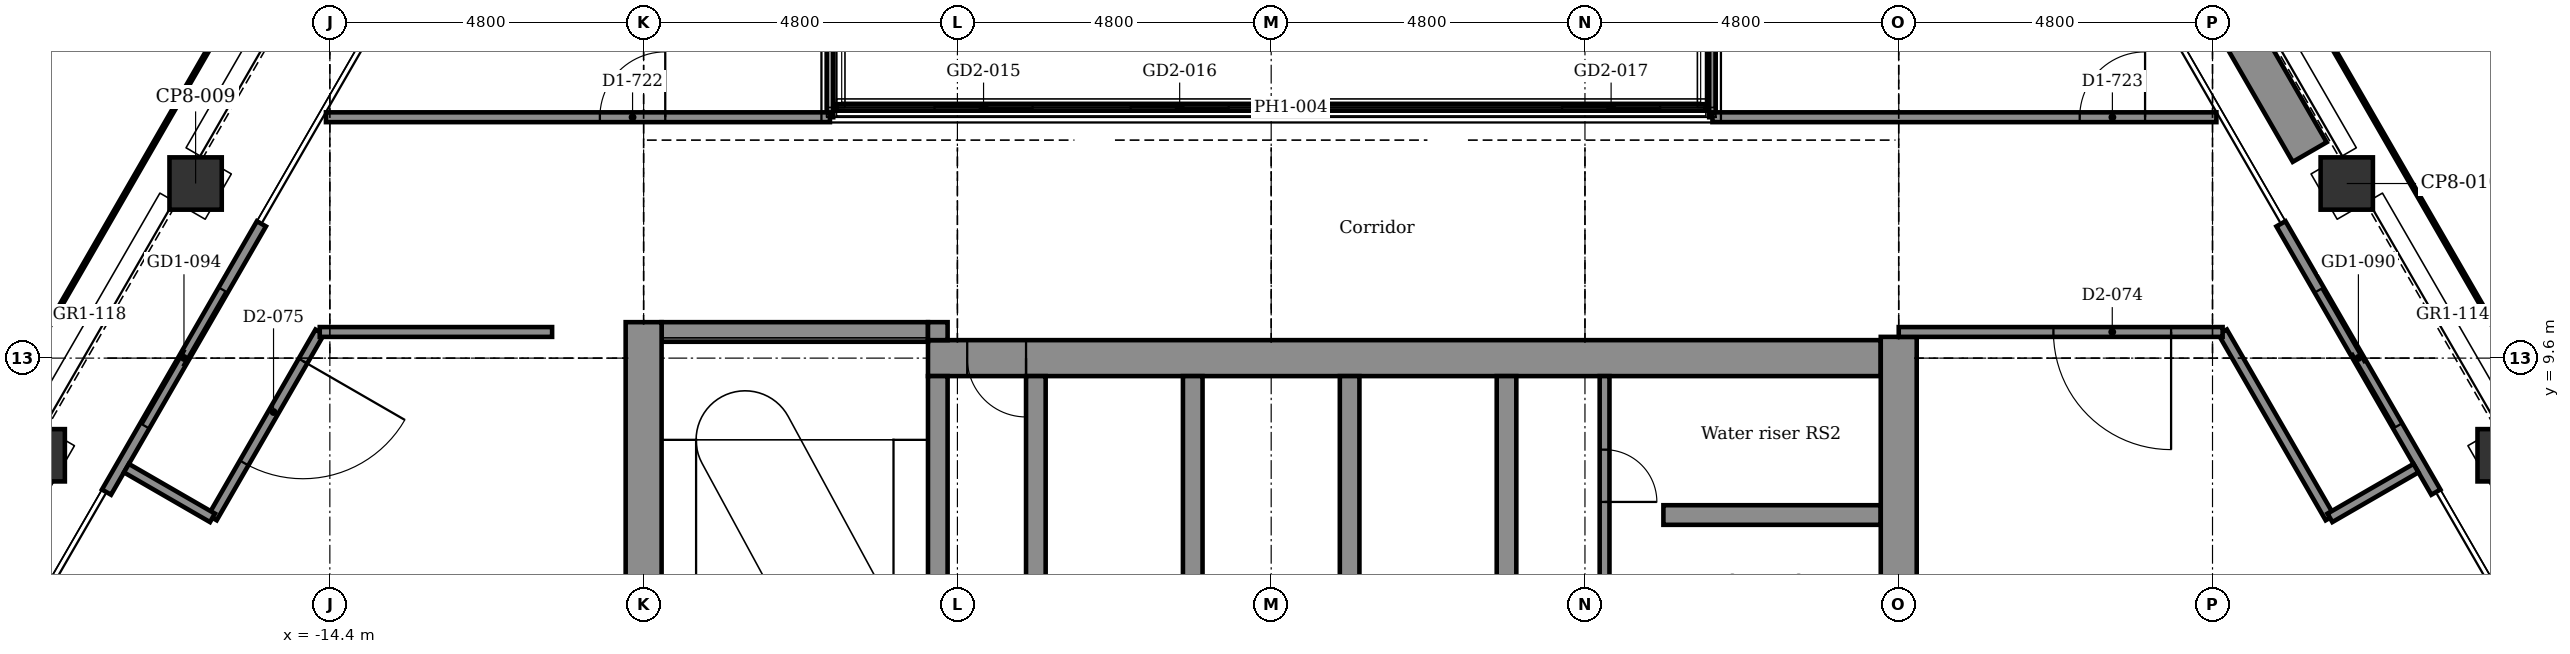
"""IFC4 building model, lengths in metres.
Left out: names, types, materials, properties, quantities, classifications, styles, units other than length and angle.
Written with IfcOpenShell. Run it as: python <this file> out.ifc"""

import sys

from ifc_helpers import new_model, si_unit, direction, frame, frame_2d, origin, origin_2d, place, context, subcontext, project, spatial, rectangle, extrude, element, fill, save


model = new_model("IFC4")
c1 = context("Model", 3, precision=1e-05, world=origin(), true_north=direction((0.0, 1.0)))
c2 = subcontext(c1, "Body", "Model", "MODEL_VIEW")
j1 = project(units=[si_unit("LENGTHUNIT", "METRE"), si_unit("PLANEANGLEUNIT", "RADIAN")], contexts=[c1])
p1 = place(None, origin())
s1 = spatial("IfcSite", under=j1, at=p1, CompositionType="ELEMENT")
p2 = place(p1, origin())
s2 = spatial("IfcBuilding", under=s1, at=p2, CompositionType="ELEMENT")
p3 = place(p2, frame((0.0, 0.0, 269.6)))
s3 = spatial("IfcBuildingStorey", under=s2, at=p3, CompositionType="ELEMENT", Elevation=269.6)
for number, where, z_axis, x_axis in (
    (1, (16.454, 12.271, -0.15), (0.0, 0.0, 1.0), (0.866, 0.5, 0.0)),
    (2, (18.854, 8.114, -0.15), (0.0, 0.0, 1.0), (0.866, 0.5, 0.0)),
    (3, (-18.854, 8.114, -0.15), (0.0, 0.0, 1.0), (0.5, 0.866, 0.0)),
    (4, (-16.454, 12.271, -0.15), (0.0, 0.0, 1.0), (0.5, 0.866, 0.0)),
):
    element("IfcColumn", number, at=place(p3, frame(where, z_axis=z_axis, x_axis=x_axis)), inside=s3, PredefinedType="COLUMN", context=c2, shape_type="SweptSolid", body=[
        extrude(rectangle(XDim=0.8, YDim=0.8, at=origin_2d()), origin(), (0.0, 0.0, 1.0), 3.9),
    ])
p4 = place(p3, frame((6.0, 7.2, -0.15), z_axis=(0.0, 0.0, 1.0), x_axis=(1.0, 0.0, 0.0)))
e5 = element("IfcWall", 5, at=p4, inside=s3, PredefinedType="STANDARD", context=c2, shape_type="SweptSolid", body=[
    extrude(rectangle(XDim=3.325, YDim=0.3, at=frame_2d((1.663, 0.0))), origin(), (0.0, 0.0, 1.0), 3.9),
])
p5 = place(p3, frame((-5.25, 9.6, -0.15), z_axis=(0.0, 0.0, 1.0), x_axis=(1.0, 0.0, 0.0)))
e6 = element("IfcWall", 6, at=p5, inside=s3, PredefinedType="SHEAR", context=c2, shape_type="SweptSolid", body=[
    extrude(rectangle(XDim=14.575, YDim=0.55, at=frame_2d((7.288, 0.0))), origin(), (0.0, 0.0, 1.0), 3.9),
])
p6 = place(p5, frame((0.6, 0.0, 0.15)))
e7 = element("IfcOpeningElement", 7, at=p6, cuts=e6, PredefinedType="OPENING", context=c2, shape_type="SweptSolid", body=[
    extrude(rectangle(XDim=0.9, YDim=2.1, at=frame_2d((0.45, 1.05))), frame((0.0, 0.285, 0.0), z_axis=(0.0, -1.0, 0.0), x_axis=(1.0, 0.0, 0.0)), (0.0, 0.0, 1.0), 0.57),
])
p7 = place(p3, frame((-9.325, 10.0, -0.15), z_axis=(0.0, 0.0, 1.0), x_axis=(1.0, 0.0, 0.0)))
e8 = element("IfcWall", 8, at=p7, inside=s3, PredefinedType="STANDARD", context=c2, shape_type="SweptSolid", body=[
    extrude(rectangle(XDim=4.075, YDim=0.3, at=frame_2d((2.038, 0.0))), origin(), (0.0, 0.0, 1.0), 3.9),
])
p8 = place(p3, frame((-9.6, 2.55, -0.15), z_axis=(0.0, 0.0, 1.0), x_axis=(0.0, 1.0, 0.0)))
e9 = element("IfcWall", 9, at=p8, inside=s3, PredefinedType="SHEAR", context=c2, shape_type="SweptSolid", body=[
    extrude(rectangle(XDim=7.6, YDim=0.55, at=frame_2d((3.8, 0.0))), origin(), (0.0, 0.0, 1.0), 3.9),
])
p9 = place(p3, frame((-5.1, 2.25, -0.15), z_axis=(0.0, 0.0, 1.0), x_axis=(0.0, 1.0, 0.0)))
e10 = element("IfcWall", 10, at=p9, inside=s3, PredefinedType="STANDARD", context=c2, shape_type="SweptSolid", body=[
    extrude(rectangle(XDim=7.075, YDim=0.3, at=frame_2d((3.538, 0.0))), origin(), (0.0, 0.0, 1.0), 3.9),
])
p10 = place(p9, frame((2.0, 0.0, 0.15)))
e11 = element("IfcOpeningElement", 11, at=p10, cuts=e10, PredefinedType="OPENING", context=c2, shape_type="SweptSolid", body=[
    extrude(rectangle(XDim=1.2, YDim=2.1, at=frame_2d((0.6, 1.05))), frame((0.0, 0.16, 0.0), z_axis=(0.0, -1.0, 0.0), x_axis=(1.0, 0.0, 0.0)), (0.0, 0.0, 1.0), 0.32),
])
p11 = place(p3, frame((-5.1, 9.875, -0.15), z_axis=(0.0, 0.0, 1.0), x_axis=(0.0, 1.0, 0.0)))
e12 = element("IfcWall", 12, at=p11, inside=s3, PredefinedType="STANDARD", context=c2, shape_type="SweptSolid", body=[
    extrude(rectangle(XDim=0.275, YDim=0.3, at=frame_2d((0.137, 0.0))), origin(), (0.0, 0.0, 1.0), 3.9),
])
for number, where, z_axis, x_axis in (
    (13, (-3.6, 5.85, -0.15), (0.0, 0.0, 1.0), (0.0, 1.0, 0.0)),
    (14, (-1.2, 5.85, -0.15), (0.0, 0.0, 1.0), (0.0, 1.0, 0.0)),
    (15, (1.2, 5.85, -0.15), (0.0, 0.0, 1.0), (0.0, 1.0, 0.0)),
    (16, (3.6, 5.85, -0.15), (0.0, 0.0, 1.0), (0.0, 1.0, 0.0)),
):
    element("IfcWall", number, at=place(p3, frame(where, z_axis=z_axis, x_axis=x_axis)), inside=s3, PredefinedType="STANDARD", context=c2, shape_type="SweptSolid", body=[
        extrude(rectangle(XDim=3.475, YDim=0.3, at=frame_2d((1.737, 0.0))), origin(), (0.0, 0.0, 1.0), 3.9),
    ])
p12 = place(p3, frame((9.6, -10.15, -0.15), z_axis=(0.0, 0.0, 1.0), x_axis=(0.0, 1.0, 0.0)))
e17 = element("IfcWall", 17, at=p12, inside=s3, PredefinedType="SHEAR", context=c2, shape_type="SweptSolid", body=[
    extrude(rectangle(XDim=20.075, YDim=0.55, at=frame_2d((10.038, 0.0))), origin(), (0.0, 0.0, 1.0), 3.9),
])
p13 = place(p3, frame((15.447, 11.655, 0.0), z_axis=(0.0, 0.0, 1.0), x_axis=(0.499978080042, -0.866038058908, 0.0)))
e18 = element("IfcWall", 18, at=p13, inside=s3, PredefinedType="PARTITIONING", context=c2, shape_type="SweptSolid", body=[
    extrude(rectangle(XDim=4.74, YDim=0.16, at=frame_2d((2.37, 0.0))), origin(), (0.0, 0.0, 1.0), 3.75),
])
p14 = place(p13, frame((1.17, 0.0, 0.0)))
e19 = element("IfcOpeningElement", 19, at=p14, cuts=e18, PredefinedType="OPENING", context=c2, shape_type="SweptSolid", body=[
    extrude(rectangle(XDim=2.4, YDim=2.4, at=frame_2d((1.2, 1.2))), frame((0.0, 0.09, 0.0), z_axis=(0.0, -1.0, 0.0), x_axis=(1.0, 0.0, 0.0)), (0.0, 0.0, 1.0), 0.18),
])
p15 = place(p3, frame((-17.817, 7.55, 0.0), z_axis=(0.0, 0.0, 1.0), x_axis=(0.499978080042, 0.866038058908, 0.0)))
e20 = element("IfcWall", 20, at=p15, inside=s3, PredefinedType="PARTITIONING", context=c2, shape_type="SweptSolid", body=[
    extrude(rectangle(XDim=4.74, YDim=0.16, at=frame_2d((2.37, 0.0))), origin(), (0.0, 0.0, 1.0), 3.75),
])
p16 = place(p15, frame((1.17, 0.0, 0.0)))
e21 = element("IfcOpeningElement", 21, at=p16, cuts=e20, PredefinedType="OPENING", context=c2, shape_type="SweptSolid", body=[
    extrude(rectangle(XDim=2.4, YDim=2.4, at=frame_2d((1.2, 1.2))), frame((0.0, 0.09, 0.0), z_axis=(0.0, -1.0, 0.0), x_axis=(1.0, 0.0, 0.0)), (0.0, 0.0, 1.0), 0.18),
])
p17 = place(p3, frame((14.187, 15.697, 0.0), z_axis=(0.0, 0.0, 1.0), x_axis=(0.499977295307, -0.866038511948, 0.0)))
e22 = element("IfcWall", 22, at=p17, inside=s3, PredefinedType="USERDEFINED", context=c2, shape_type="SweptSolid", body=[
    extrude(rectangle(XDim=3.4, YDim=0.6, at=frame_2d((1.7, 0.0))), origin(), (0.0, 0.0, 1.0), 0.7),
])
p18 = place(p3, frame((6.65, 13.435, 0.0), z_axis=(0.0, 0.0, 1.0), x_axis=(-1.0, 0.0, 0.0)))
e23 = element("IfcWall", 23, at=p18, inside=s3, PredefinedType="PARAPET", context=c2, shape_type="SweptSolid", body=[
    extrude(rectangle(XDim=13.3, YDim=0.1, at=frame_2d((6.65, 0.0))), origin(), (0.0, 0.0, 1.0), 2.5),
])
p19 = place(p18, frame((10.3, 0.0, 0.0)))
e24 = element("IfcOpeningElement", 24, at=p19, cuts=e23, PredefinedType="OPENING", context=c2, shape_type="SweptSolid", body=[
    extrude(rectangle(XDim=1.5, YDim=2.4, at=frame_2d((0.75, 1.2))), frame((0.0, 0.06, 0.0), z_axis=(0.0, -1.0, 0.0), x_axis=(1.0, 0.0, 0.0)), (0.0, 0.0, 1.0), 0.12),
])
p20 = place(p18, frame((7.3, 0.0, 0.0)))
e25 = element("IfcOpeningElement", 25, at=p20, cuts=e23, PredefinedType="OPENING", context=c2, shape_type="SweptSolid", body=[
    extrude(rectangle(XDim=1.5, YDim=2.4, at=frame_2d((0.75, 1.2))), frame((0.0, 0.06, 0.0), z_axis=(0.0, -1.0, 0.0), x_axis=(1.0, 0.0, 0.0)), (0.0, 0.0, 1.0), 0.12),
])
p21 = place(p18, frame((0.7, 0.0, 0.0)))
e26 = element("IfcOpeningElement", 26, at=p21, cuts=e23, PredefinedType="OPENING", context=c2, shape_type="SweptSolid", body=[
    extrude(rectangle(XDim=1.5, YDim=2.4, at=frame_2d((0.75, 1.2))), frame((0.0, 0.06, 0.0), z_axis=(0.0, -1.0, 0.0), x_axis=(1.0, 0.0, 0.0)), (0.0, 0.0, 1.0), 0.12),
])
p22 = place(p3, frame((6.75, 13.285, 0.0), z_axis=(0.0, 0.0, 1.0), x_axis=(0.0, 1.0, 0.0)))
e27 = element("IfcWall", 27, at=p22, inside=s3, PredefinedType="PARTITIONING", context=c2, shape_type="SweptSolid", body=[
    extrude(rectangle(XDim=5.83, YDim=0.1, at=frame_2d((2.915, 0.0))), origin(), (0.0, 0.0, 1.0), 3.75),
])
p23 = place(p3, frame((5.1, 6.0, 0.0), z_axis=(0.0, 0.0, 1.0), x_axis=(0.0, 1.0, 0.0)))
e28 = element("IfcWall", 28, at=p23, inside=s3, PredefinedType="PARTITIONING", context=c2, shape_type="SweptSolid", body=[
    extrude(rectangle(XDim=3.325, YDim=0.15, at=frame_2d((1.663, 0.0))), origin(), (0.0, 0.0, 1.0), 3.75),
])
p24 = place(p23, frame((1.4, 0.0, 0.0)))
e29 = element("IfcOpeningElement", 29, at=p24, cuts=e28, PredefinedType="OPENING", context=c2, shape_type="SweptSolid", body=[
    extrude(rectangle(XDim=0.8, YDim=2.1, at=frame_2d((0.4, 1.05))), frame((0.0, 0.085, 0.0), z_axis=(0.0, -1.0, 0.0), x_axis=(1.0, 0.0, 0.0)), (0.0, 0.0, 1.0), 0.17),
])
p25 = place(p3, frame((-6.75, 13.285, 0.0), z_axis=(0.0, 0.0, 1.0), x_axis=(0.0, 1.0, 0.0)))
e30 = element("IfcWall", 30, at=p25, inside=s3, PredefinedType="PARTITIONING", context=c2, shape_type="SweptSolid", body=[
    extrude(rectangle(XDim=5.83, YDim=0.1, at=frame_2d((2.915, 0.0))), origin(), (0.0, 0.0, 1.0), 3.75),
])
p26 = place(p3, frame((14.555, 10.0, 0.0), z_axis=(0.0, 0.0, 1.0), x_axis=(0.499954196102, -0.866051847062, 0.0)))
e31 = element("IfcWall", 31, at=p26, inside=s3, PredefinedType="PARTITIONING", context=c2, shape_type="SweptSolid", body=[
    extrude(rectangle(XDim=3.283, YDim=0.15, at=frame_2d((1.642, 0.0))), origin(), (0.0, 0.0, 1.0), 3.75),
])
p27 = place(p3, frame((-16.196, 7.157, 0.0), z_axis=(0.0, 0.0, 1.0), x_axis=(0.499954196102, 0.866051847062, 0.0)))
e32 = element("IfcWall", 32, at=p27, inside=s3, PredefinedType="PARTITIONING", context=c2, shape_type="SweptSolid", body=[
    extrude(rectangle(XDim=3.283, YDim=0.15, at=frame_2d((1.642, 0.0))), origin(), (0.0, 0.0, 1.0), 3.75),
])
p28 = place(p27, frame((0.969, 0.0, 0.0)))
e33 = element("IfcOpeningElement", 33, at=p28, cuts=e32, PredefinedType="OPENING", context=c2, shape_type="SweptSolid", body=[
    extrude(rectangle(XDim=1.8, YDim=2.1, at=frame_2d((0.9, 1.05))), frame((0.0, 0.085, 0.0), z_axis=(0.0, -1.0, 0.0), x_axis=(1.0, 0.0, 0.0)), (0.0, 0.0, 1.0), 0.17),
])
for number, where, z_axis, x_axis in (
    (34, (-17.512, 7.917, 0.0), (0.0, 0.0, 1.0), (0.866, -0.5, 0.0)),
    (35, (16.196, 7.157, 0.0), (0.0, 0.0, 1.0), (0.866, 0.5, 0.0)),
):
    element("IfcWall", number, at=place(p3, frame(where, z_axis=z_axis, x_axis=x_axis)), inside=s3, PredefinedType="PARTITIONING", context=c2, shape_type="SweptSolid", body=[
        extrude(rectangle(XDim=1.52, YDim=0.15, at=frame_2d((0.76, 0.0))), origin(), (0.0, 0.0, 1.0), 3.75),
    ])
p29 = place(p3, frame((-14.555, 10.0, 0.0), z_axis=(0.0, 0.0, 1.0), x_axis=(1.0, 0.0, 0.0)))
e36 = element("IfcWall", 36, at=p29, inside=s3, PredefinedType="PARTITIONING", context=c2, shape_type="SweptSolid", body=[
    extrude(rectangle(XDim=3.555, YDim=0.15, at=frame_2d((1.777, 0.0))), origin(), (0.0, 0.0, 1.0), 3.75),
])
p30 = place(p3, frame((9.6, 10.0, 0.0), z_axis=(0.0, 0.0, 1.0), x_axis=(1.0, 0.0, 0.0)))
e37 = element("IfcWall", 37, at=p30, inside=s3, PredefinedType="PARTITIONING", context=c2, shape_type="SweptSolid", body=[
    extrude(rectangle(XDim=4.955, YDim=0.15, at=frame_2d((2.477, 0.0))), origin(), (0.0, 0.0, 1.0), 3.75),
])
p31 = place(p30, frame((2.366, 0.0, 0.0)))
e38 = element("IfcOpeningElement", 38, at=p31, cuts=e37, PredefinedType="OPENING", context=c2, shape_type="SweptSolid", body=[
    extrude(rectangle(XDim=1.8, YDim=2.1, at=frame_2d((0.9, 1.05))), frame((0.0, 0.085, 0.0), z_axis=(0.0, -1.0, 0.0), x_axis=(1.0, 0.0, 0.0)), (0.0, 0.0, 1.0), 0.17),
])
p32 = place(p3, frame((-14.459, 13.285, 0.0), z_axis=(0.0, 0.0, 1.0), x_axis=(1.0, 0.0, 0.0)))
e39 = element("IfcWall", 39, at=p32, inside=s3, PredefinedType="PARTITIONING", context=c2, shape_type="SweptSolid", body=[
    extrude(rectangle(XDim=7.709, YDim=0.15, at=frame_2d((3.855, 0.0))), origin(), (0.0, 0.0, 1.0), 3.75),
])
p33 = place(p32, frame((4.19, 0.0, 0.0)))
e40 = element("IfcOpeningElement", 40, at=p33, cuts=e39, PredefinedType="OPENING", context=c2, shape_type="SweptSolid", body=[
    extrude(rectangle(XDim=1.0, YDim=2.1, at=frame_2d((0.5, 1.05))), frame((0.0, 0.085, 0.0), z_axis=(0.0, -1.0, 0.0), x_axis=(1.0, 0.0, 0.0)), (0.0, 0.0, 1.0), 0.17),
])
p34 = place(p3, frame((6.75, 13.285, 0.0), z_axis=(0.0, 0.0, 1.0), x_axis=(1.0, 0.0, 0.0)))
e41 = element("IfcWall", 41, at=p34, inside=s3, PredefinedType="PARTITIONING", context=c2, shape_type="SweptSolid", body=[
    extrude(rectangle(XDim=7.709, YDim=0.15, at=frame_2d((3.855, 0.0))), origin(), (0.0, 0.0, 1.0), 3.75),
])
p35 = place(p34, frame((5.618, 0.0, 0.0)))
e42 = element("IfcOpeningElement", 42, at=p35, cuts=e41, PredefinedType="OPENING", context=c2, shape_type="SweptSolid", body=[
    extrude(rectangle(XDim=1.0, YDim=2.1, at=frame_2d((0.5, 1.05))), frame((0.0, 0.085, 0.0), z_axis=(0.0, -1.0, 0.0), x_axis=(1.0, 0.0, 0.0)), (0.0, 0.0, 1.0), 0.17),
])
p36 = place(p14, origin())
e43 = element("IfcDoor", 43, at=p36, inside=s3, OperationType="DOUBLE_DOOR_SLIDING", PredefinedType="DOOR", context=c2, shape_type="SweptSolid", body=[
    extrude(rectangle(XDim=2.4, YDim=2.4, at=frame_2d((1.2, 1.2))), frame((0.0, 0.025, 0.0), z_axis=(0.0, -1.0, 0.0), x_axis=(1.0, 0.0, 0.0)), (0.0, 0.0, 1.0), 0.05),
])
fill(e19, e43)
p37 = place(p16, origin())
e44 = element("IfcDoor", 44, at=p37, inside=s3, OperationType="DOUBLE_DOOR_SLIDING", PredefinedType="DOOR", context=c2, shape_type="SweptSolid", body=[
    extrude(rectangle(XDim=2.4, YDim=2.4, at=frame_2d((1.2, 1.2))), frame((0.0, 0.025, 0.0), z_axis=(0.0, -1.0, 0.0), x_axis=(1.0, 0.0, 0.0)), (0.0, 0.0, 1.0), 0.05),
])
fill(e21, e44)
p38 = place(p19, origin())
e45 = element("IfcDoor", 45, at=p38, inside=s3, OperationType="DOUBLE_DOOR_SLIDING", PredefinedType="DOOR", context=c2, shape_type="SweptSolid", body=[
    extrude(rectangle(XDim=1.5, YDim=2.4, at=frame_2d((0.75, 1.2))), frame((0.0, 0.025, 0.0), z_axis=(0.0, -1.0, 0.0), x_axis=(1.0, 0.0, 0.0)), (0.0, 0.0, 1.0), 0.05),
])
fill(e24, e45)
p39 = place(p20, origin())
e46 = element("IfcDoor", 46, at=p39, inside=s3, OperationType="DOUBLE_DOOR_SLIDING", PredefinedType="DOOR", context=c2, shape_type="SweptSolid", body=[
    extrude(rectangle(XDim=1.5, YDim=2.4, at=frame_2d((0.75, 1.2))), frame((0.0, 0.025, 0.0), z_axis=(0.0, -1.0, 0.0), x_axis=(1.0, 0.0, 0.0)), (0.0, 0.0, 1.0), 0.05),
])
fill(e25, e46)
p40 = place(p21, origin())
e47 = element("IfcDoor", 47, at=p40, inside=s3, OperationType="DOUBLE_DOOR_SLIDING", PredefinedType="DOOR", context=c2, shape_type="SweptSolid", body=[
    extrude(rectangle(XDim=1.5, YDim=2.4, at=frame_2d((0.75, 1.2))), frame((0.0, 0.025, 0.0), z_axis=(0.0, -1.0, 0.0), x_axis=(1.0, 0.0, 0.0)), (0.0, 0.0, 1.0), 0.05),
])
fill(e26, e47)
p41 = place(p24, frame((0.8, 0.0, 0.0), z_axis=(0.0, 0.0, 1.0), x_axis=(-1.0, 0.0, 0.0)))
e48 = element("IfcDoor", 48, at=p41, inside=s3, OperationType="SINGLE_SWING_LEFT", PredefinedType="DOOR", context=c2, shape_type="SweptSolid", body=[
    extrude(rectangle(XDim=0.8, YDim=2.1, at=frame_2d((0.4, 1.05))), frame((0.0, 0.025, 0.0), z_axis=(0.0, -1.0, 0.0), x_axis=(1.0, 0.0, 0.0)), (0.0, 0.0, 1.0), 0.05),
])
fill(e29, e48)
p42 = place(p33, origin())
e49 = element("IfcDoor", 49, at=p42, inside=s3, OperationType="SINGLE_SWING_RIGHT", PredefinedType="DOOR", context=c2, shape_type="SweptSolid", body=[
    extrude(rectangle(XDim=1.0, YDim=2.1, at=frame_2d((0.5, 1.05))), frame((0.0, 0.025, 0.0), z_axis=(0.0, -1.0, 0.0), x_axis=(1.0, 0.0, 0.0)), (0.0, 0.0, 1.0), 0.05),
])
fill(e40, e49)
p43 = place(p35, origin())
e50 = element("IfcDoor", 50, at=p43, inside=s3, OperationType="SINGLE_SWING_RIGHT", PredefinedType="DOOR", context=c2, shape_type="SweptSolid", body=[
    extrude(rectangle(XDim=1.0, YDim=2.1, at=frame_2d((0.5, 1.05))), frame((0.0, 0.025, 0.0), z_axis=(0.0, -1.0, 0.0), x_axis=(1.0, 0.0, 0.0)), (0.0, 0.0, 1.0), 0.05),
])
fill(e42, e50)
p44 = place(p31, frame((1.8, 0.0, 0.0), z_axis=(0.0, 0.0, 1.0), x_axis=(-1.0, 0.0, 0.0)))
e51 = element("IfcDoor", 51, at=p44, inside=s3, OperationType="SINGLE_SWING_RIGHT", PredefinedType="DOOR", context=c2, shape_type="SweptSolid", body=[
    extrude(rectangle(XDim=1.8, YDim=2.1, at=frame_2d((0.9, 1.05))), frame((0.0, 0.025, 0.0), z_axis=(0.0, -1.0, 0.0), x_axis=(1.0, 0.0, 0.0)), (0.0, 0.0, 1.0), 0.05),
])
fill(e38, e51)
p45 = place(p28, frame((1.8, 0.0, 0.0), z_axis=(0.0, 0.0, 1.0), x_axis=(-1.0, 0.0, 0.0)))
e52 = element("IfcDoor", 52, at=p45, inside=s3, OperationType="SINGLE_SWING_RIGHT", PredefinedType="DOOR", context=c2, shape_type="SweptSolid", body=[
    extrude(rectangle(XDim=1.8, YDim=2.1, at=frame_2d((0.9, 1.05))), frame((0.0, 0.025, 0.0), z_axis=(0.0, -1.0, 0.0), x_axis=(1.0, 0.0, 0.0)), (0.0, 0.0, 1.0), 0.05),
])
fill(e33, e52)
p46 = place(p6, frame((0.9, 0.0, 0.0), z_axis=(0.0, 0.0, 1.0), x_axis=(-1.0, 0.0, 0.0)))
e53 = element("IfcDoor", 53, at=p46, inside=s3, OperationType="SINGLE_SWING_RIGHT", PredefinedType="DOOR", context=c2, shape_type="SweptSolid", body=[
    extrude(rectangle(XDim=0.9, YDim=2.1, at=frame_2d((0.45, 1.05))), frame((0.0, 0.025, 0.0), z_axis=(0.0, -1.0, 0.0), x_axis=(1.0, 0.0, 0.0)), (0.0, 0.0, 1.0), 0.05),
])
fill(e7, e53)
save(model, sys.argv[1])
